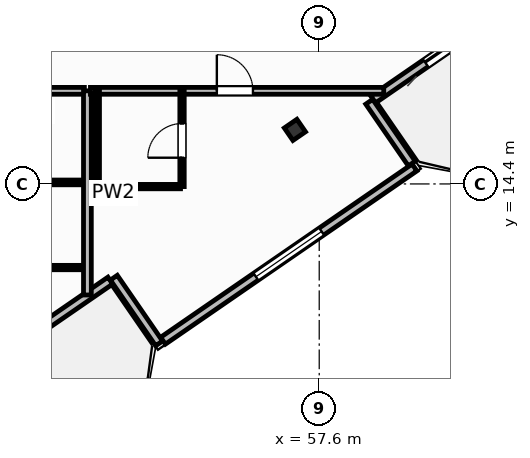
"""IFC4 building model, lengths in metres.
Left out: names, types, materials, properties, quantities, classifications, styles, units other than length and angle.
Written with IfcOpenShell. Run it as: python <this file> out.ifc"""

import sys

from ifc_helpers import new_model, si_unit, direction, frame, frame_2d, origin, origin_2d, place, context, subcontext, project, spatial, rectangle, i_section, extrude, element, fill, save


model = new_model("IFC4")
c1 = context("Model", 3, precision=1e-05, world=origin(), true_north=direction((0.0, 1.0)))
c2 = subcontext(c1, "Body", "Model", "MODEL_VIEW")
j1 = project(units=[si_unit("LENGTHUNIT", "METRE"), si_unit("PLANEANGLEUNIT", "RADIAN")], contexts=[c1])
p1 = place(None, origin())
s1 = spatial("IfcSite", under=j1, at=p1, CompositionType="ELEMENT")
p2 = place(p1, origin())
s2 = spatial("IfcBuilding", under=s1, at=p2, CompositionType="ELEMENT")
p3 = place(p2, frame((0.0, 0.0, 276.7)))
s3 = spatial("IfcBuildingStorey", under=s2, at=p3, CompositionType="ELEMENT", Elevation=276.7)
p4 = place(p3, frame((56.96, 15.823, 0.0), z_axis=(0.0, 0.0, 1.0), x_axis=(0.823532597628, 0.567268949127, 0.0)))
e1 = element("IfcColumn", 1, at=p4, inside=s3, PredefinedType="COLUMN", context=c2, shape_type="SweptSolid", body=[
    extrude(i_section(OverallWidth=0.401, OverallDepth=0.399, WebThickness=0.025, FlangeThickness=0.04, FilletRadius=0.022, at=origin_2d()), origin(), (0.0, 0.0, 1.0), 3.7),
])
p5 = place(p3, frame((52.103, 11.857, 0.0), z_axis=(0.0, 0.0, 1.0), x_axis=(-0.823534636215, -0.567265989598, 0.0)))
e2 = element("IfcWall", 2, at=p5, inside=s3, PredefinedType="SOLIDWALL", context=c2, shape_type="SweptSolid", body=[
    extrude(rectangle(XDim=6.0, YDim=0.22, at=frame_2d((3.0, 0.0))), origin(), (0.0, 0.0, 1.0), 2.73),
])
p6 = place(p5, frame((3.5, 0.0, 0.0)))
e3 = element("IfcOpeningElement", 3, at=p6, cuts=e2, PredefinedType="OPENING", context=c2, shape_type="SweptSolid", body=[
    extrude(rectangle(XDim=2.1, YDim=2.3, at=frame_2d((1.05, 1.15))), frame((0.0, 0.12, 0.0), z_axis=(0.0, -1.0, 0.0), x_axis=(1.0, 0.0, 0.0)), (0.0, 0.0, 1.0), 0.24),
])
p7 = place(p3, frame((63.605, 19.78, 0.0), z_axis=(0.0, 0.0, 1.0), x_axis=(-0.823541290762, -0.567256328665, 0.0)))
e4 = element("IfcWall", 4, at=p7, inside=s3, PredefinedType="SOLIDWALL", context=c2, shape_type="SweptSolid", body=[
    extrude(rectangle(XDim=5.567, YDim=0.22, at=frame_2d((2.784, 0.0))), origin(), (0.0, 0.0, 1.0), 2.73),
])
p8 = place(p7, frame((1.787, 0.0, 0.0)))
e5 = element("IfcOpeningElement", 5, at=p8, cuts=e4, PredefinedType="OPENING", context=c2, shape_type="SweptSolid", body=[
    extrude(rectangle(XDim=2.1, YDim=2.3, at=frame_2d((1.05, 1.15))), frame((0.0, 0.12, 0.0), z_axis=(0.0, -1.0, 0.0), x_axis=(1.0, 0.0, 0.0)), (0.0, 0.0, 1.0), 0.24),
])
p9 = place(p3, frame((52.196, 11.933, 0.0), z_axis=(0.0, 0.0, 1.0), x_axis=(0.56729822855, -0.823512428494, 0.0)))
e6 = element("IfcWall", 6, at=p9, inside=s3, PredefinedType="SOLIDWALL", context=c2, shape_type="SweptSolid", body=[
    extrude(rectangle(XDim=2.1, YDim=0.22, at=frame_2d((1.05, 0.0))), origin(), (0.0, 0.0, 1.0), 2.73),
])
p10 = place(p3, frame((53.49, 10.275, 0.0), z_axis=(0.0, 0.0, 1.0), x_axis=(0.823530942962, 0.56727135128, 0.0)))
e7 = element("IfcWall", 7, at=p10, inside=s3, PredefinedType="SOLIDWALL", context=c2, shape_type="SweptSolid", body=[
    extrude(rectangle(XDim=8.035, YDim=0.22, at=frame_2d((4.018, 0.0))), origin(), (0.0, 0.0, 1.0), 2.73),
])
p11 = place(p10, frame((2.968, 0.0, 0.8)))
e8 = element("IfcOpeningElement", 8, at=p11, cuts=e7, PredefinedType="OPENING", context=c2, shape_type="SweptSolid", body=[
    extrude(rectangle(XDim=2.1, YDim=1.75, at=frame_2d((1.05, 0.875))), frame((0.0, 0.12, 0.0), z_axis=(0.0, -1.0, 0.0), x_axis=(1.0, 0.0, 0.0)), (0.0, 0.0, 1.0), 0.24),
])
p12 = place(p3, frame((60.036, 14.936, 0.0), z_axis=(0.0, 0.0, 1.0), x_axis=(-0.567273565974, 0.823529417415, 0.0)))
e9 = element("IfcWall", 9, at=p12, inside=s3, PredefinedType="SOLIDWALL", context=c2, shape_type="SweptSolid", body=[
    extrude(rectangle(XDim=1.975, YDim=0.22, at=frame_2d((0.988, 0.0))), origin(), (0.0, 0.0, 1.0), 2.73),
])
p13 = place(p3, frame((39.28, 16.85, 0.0), z_axis=(0.0, 0.0, 1.0), x_axis=(1.0, 0.0, 0.0)))
e10 = element("IfcWall", 10, at=p13, inside=s3, PredefinedType="PARTITIONING", context=c2, shape_type="SweptSolid", body=[
    extrude(rectangle(XDim=12.14, YDim=0.18, at=frame_2d((6.07, 0.0))), origin(), (0.0, 0.0, 1.0), 3.45),
])
p14 = place(p13, frame((3.135, 0.0, 0.0)))
e11 = element("IfcOpeningElement", 11, at=p14, cuts=e10, PredefinedType="OPENING", context=c2, shape_type="SweptSolid", body=[
    extrude(rectangle(XDim=1.0, YDim=2.2, at=frame_2d((0.5, 1.1))), frame((0.0, 0.1, 0.0), z_axis=(0.0, -1.0, 0.0), x_axis=(1.0, 0.0, 0.0)), (0.0, 0.0, 1.0), 0.2),
])
p15 = place(p3, frame((46.69, 14.44, 0.0), z_axis=(0.0, 0.0, 1.0), x_axis=(1.0, 0.0, 0.0)))
e12 = element("IfcWall", 12, at=p15, inside=s3, PredefinedType="PARTITIONING", context=c2, shape_type="SweptSolid", body=[
    extrude(rectangle(XDim=4.73, YDim=0.125, at=frame_2d((2.365, 0.0))), origin(), (0.0, 0.0, 1.0), 3.45),
])
p16 = place(p3, frame((46.69, 12.2, 0.0), z_axis=(0.0, 0.0, 1.0), x_axis=(1.0, 0.0, 0.0)))
e13 = element("IfcWall", 13, at=p16, inside=s3, PredefinedType="PARTITIONING", context=c2, shape_type="SweptSolid", body=[
    extrude(rectangle(XDim=4.73, YDim=0.115, at=frame_2d((2.365, 0.0))), origin(), (0.0, 0.0, 1.0), 3.45),
])
p17 = place(p3, frame((51.5, 11.479, 0.0), z_axis=(0.0, 0.0, 1.0), x_axis=(0.0, 1.0, 0.0)))
e14 = element("IfcWall", 14, at=p17, inside=s3, PredefinedType="PARTITIONING", context=c2, shape_type="SweptSolid", body=[
    extrude(rectangle(XDim=5.372, YDim=0.205, at=frame_2d((2.686, 0.0))), origin(), (0.0, 0.0, 1.0), 3.45),
])
p18 = place(p3, frame((51.58, 16.85, 0.0), z_axis=(0.0, 0.0, 1.0), x_axis=(1.0, 0.0, 0.0)))
e15 = element("IfcWall", 15, at=p18, inside=s3, PredefinedType="PARTITIONING", context=c2, shape_type="SweptSolid", body=[
    extrude(rectangle(XDim=7.718, YDim=0.18, at=frame_2d((3.859, 0.0))), origin(), (0.0, 0.0, 1.0), 3.45),
])
p19 = place(p18, frame((3.326, 0.0, 0.0)))
e16 = element("IfcOpeningElement", 16, at=p19, cuts=e15, PredefinedType="OPENING", context=c2, shape_type="SweptSolid", body=[
    extrude(rectangle(XDim=0.95, YDim=2.15, at=frame_2d((0.475, 1.075))), frame((0.0, 0.1, 0.0), z_axis=(0.0, -1.0, 0.0), x_axis=(1.0, 0.0, 0.0)), (0.0, 0.0, 1.0), 0.2),
])
p20 = place(p3, frame((51.8, 14.33, 0.0), z_axis=(0.0, 0.0, 1.0), x_axis=(1.0, 0.0, 0.0)))
e17 = element("IfcWall", 17, at=p20, inside=s3, PredefinedType="PARTITIONING", context=c2, shape_type="SweptSolid", body=[
    extrude(rectangle(XDim=2.15, YDim=0.115, at=frame_2d((1.075, 0.0))), origin(), (0.0, 0.0, 1.0), 3.45),
])
p21 = place(p3, frame((53.99, 14.33, 0.0), z_axis=(0.0, 0.0, 1.0), x_axis=(0.0, 1.0, 0.0)))
e18 = element("IfcWall", 18, at=p21, inside=s3, PredefinedType="PARTITIONING", context=c2, shape_type="SweptSolid", body=[
    extrude(rectangle(XDim=2.52, YDim=0.115, at=frame_2d((1.26, 0.0))), origin(), (0.0, 0.0, 1.0), 3.45),
])
p22 = place(p21, frame((0.76, 0.0, 0.0)))
e19 = element("IfcOpeningElement", 19, at=p22, cuts=e18, PredefinedType="OPENING", context=c2, shape_type="SweptSolid", body=[
    extrude(rectangle(XDim=0.9, YDim=2.05, at=frame_2d((0.45, 1.025))), frame((0.0, 0.067, 0.0), z_axis=(0.0, -1.0, 0.0), x_axis=(1.0, 0.0, 0.0)), (0.0, 0.0, 1.0), 0.135),
])
p23 = place(p3, frame((51.76, 14.33, 0.0), z_axis=(0.0, 0.0, 1.0), x_axis=(0.0, 1.0, 0.0)))
e20 = element("IfcWall", 20, at=p23, inside=s3, PredefinedType="PARTITIONING", context=c2, shape_type="SweptSolid", body=[
    extrude(rectangle(XDim=2.52, YDim=0.115, at=frame_2d((1.26, 0.0))), origin(), (0.0, 0.0, 1.0), 3.45),
])
p24 = place(p8, origin())
e21 = element("IfcDoor", 21, at=p24, inside=s3, OperationType="SLIDING_TO_LEFT", PredefinedType="DOOR", context=c2, shape_type="SweptSolid", body=[
    extrude(rectangle(XDim=2.1, YDim=2.3, at=frame_2d((1.05, 1.15))), frame((0.0, 0.025, 0.0), z_axis=(0.0, -1.0, 0.0), x_axis=(1.0, 0.0, 0.0)), (0.0, 0.0, 1.0), 0.05),
])
fill(e5, e21)
p25 = place(p11, origin())
e22 = element("IfcWindow", 22, at=p25, inside=s3, PartitioningType="SINGLE_PANEL", PredefinedType="WINDOW", context=c2, shape_type="SweptSolid", body=[
    extrude(rectangle(XDim=2.1, YDim=1.75, at=frame_2d((1.05, 0.875))), frame((0.0, 0.03, 0.0), z_axis=(0.0, -1.0, 0.0), x_axis=(1.0, 0.0, 0.0)), (0.0, 0.0, 1.0), 0.06),
])
fill(e8, e22)
p26 = place(p19, origin())
e23 = element("IfcDoor", 23, at=p26, inside=s3, OperationType="SINGLE_SWING_LEFT", PredefinedType="DOOR", context=c2, shape_type="SweptSolid", body=[
    extrude(rectangle(XDim=0.95, YDim=2.15, at=frame_2d((0.475, 1.075))), frame((0.0, 0.025, 0.0), z_axis=(0.0, -1.0, 0.0), x_axis=(1.0, 0.0, 0.0)), (0.0, 0.0, 1.0), 0.05),
])
fill(e16, e23)
p27 = place(p22, origin())
e24 = element("IfcDoor", 24, at=p27, inside=s3, OperationType="SINGLE_SWING_LEFT", PredefinedType="DOOR", context=c2, shape_type="SweptSolid", body=[
    extrude(rectangle(XDim=0.9, YDim=2.05, at=frame_2d((0.45, 1.025))), frame((0.0, 0.025, 0.0), z_axis=(0.0, -1.0, 0.0), x_axis=(1.0, 0.0, 0.0)), (0.0, 0.0, 1.0), 0.05),
])
fill(e19, e24)
save(model, sys.argv[1])
